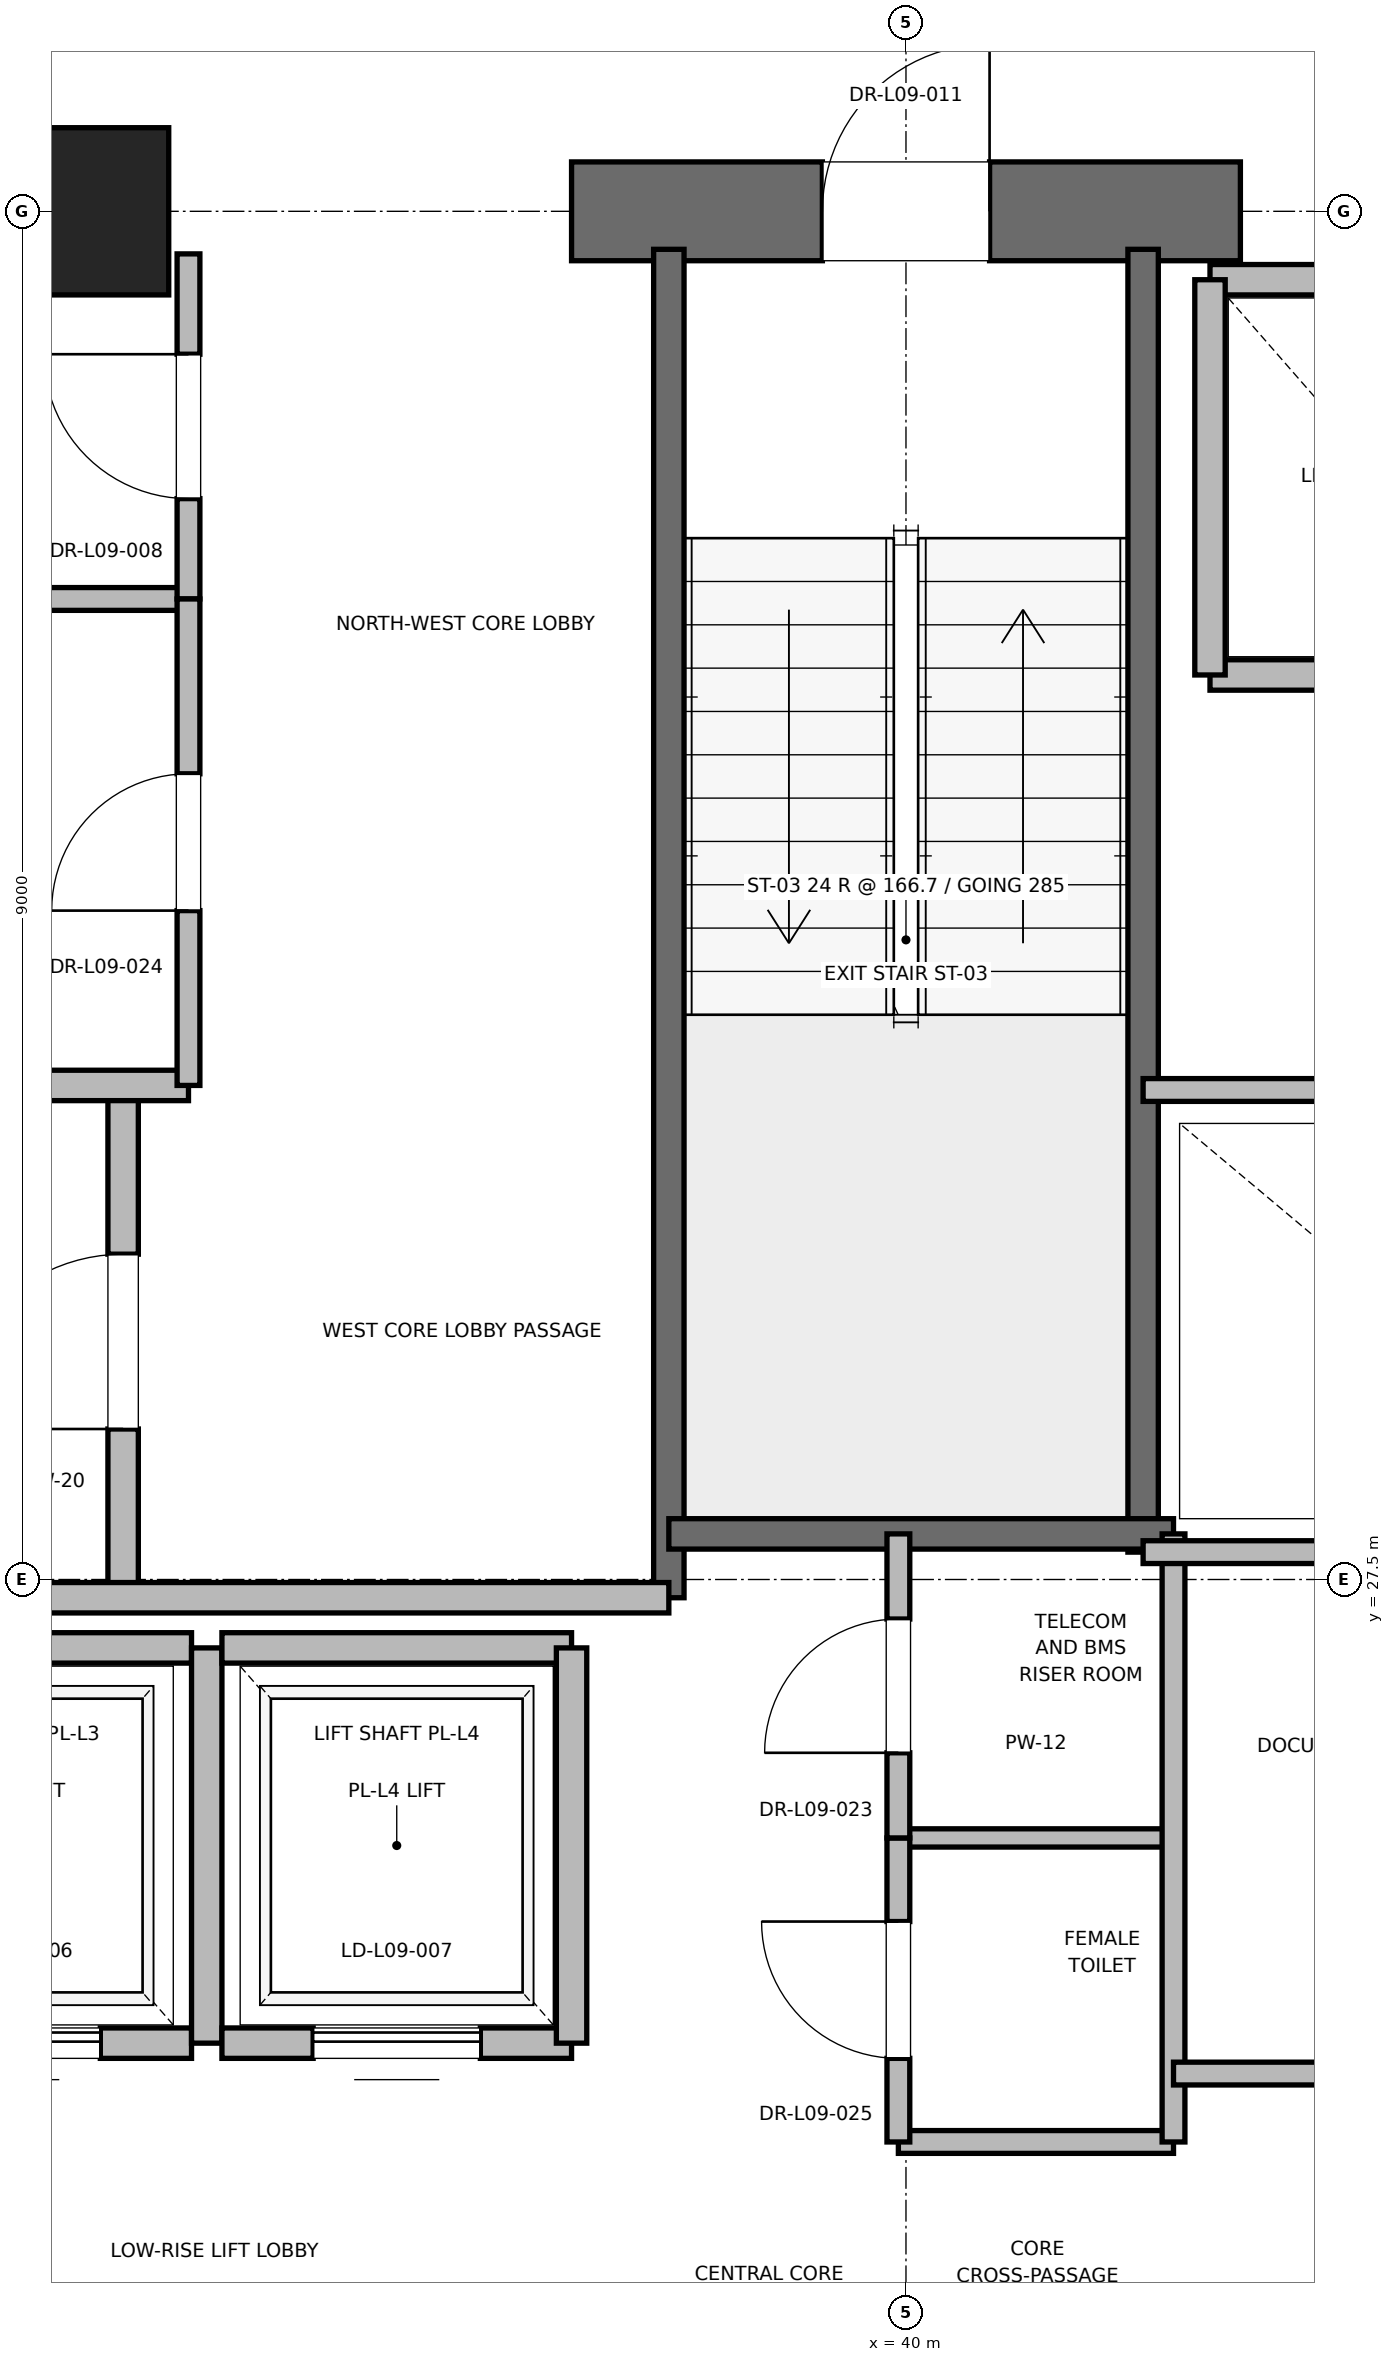
"""IFC4 building model, lengths in metres.
Left out: names, types, materials, properties, quantities, classifications, styles, units other than length and angle.
Written with IfcOpenShell. Run it as: python <this file> out.ifc"""

import sys

from ifc_helpers import new_model, si_unit, direction, frame, frame_2d, origin, origin_2d, place, context, subcontext, project, spatial, rectangle, extrude, element, fill, save


model = new_model("IFC4")
c1 = context("Model", 3, precision=1e-05, world=origin(), true_north=direction((0.0, 1.0)))
c2 = subcontext(c1, "Body", "Model", "MODEL_VIEW")
j1 = project(units=[si_unit("LENGTHUNIT", "METRE"), si_unit("PLANEANGLEUNIT", "RADIAN")], contexts=[c1])
p1 = place(None, origin())
s1 = spatial("IfcSite", under=j1, at=p1, CompositionType="ELEMENT")
p2 = place(p1, origin())
s2 = spatial("IfcBuilding", under=s1, at=p2, CompositionType="ELEMENT")
p3 = place(p2, frame((0.0, 0.0, 43.6)))
s3 = spatial("IfcBuildingStorey", under=s2, at=p3, CompositionType="ELEMENT", Elevation=43.6)
p4 = place(p3, frame((34.6, 36.5, 0.0), z_axis=(0.0, 0.0, 1.0), x_axis=(1.0, 0.0, 0.0)))
e1 = element("IfcColumn", 1, at=p4, inside=s3, PredefinedType="PILASTER", context=c2, shape_type="SweptSolid", body=[
    extrude(rectangle(XDim=1.1, YDim=1.1, at=origin_2d()), origin(), (0.0, 0.0, 1.0), 4.0),
])
p5 = place(p3, frame((29.0, 36.5, 0.0), z_axis=(0.0, 0.0, 1.0), x_axis=(1.0, 0.0, 0.0)))
e2 = element("IfcWall", 2, at=p5, inside=s3, PredefinedType="SHEAR", context=c2, shape_type="SweptSolid", body=[
    extrude(rectangle(XDim=5.8, YDim=0.65, at=frame_2d((2.9, 0.0))), origin(), (0.0, 0.0, 1.0), 3.76),
])
p6 = place(p3, frame((37.8, 36.5, 0.0), z_axis=(0.0, 0.0, 1.0), x_axis=(1.0, 0.0, 0.0)))
e3 = element("IfcWall", 3, at=p6, inside=s3, PredefinedType="SHEAR", context=c2, shape_type="SweptSolid", body=[
    extrude(rectangle(XDim=4.4, YDim=0.65, at=frame_2d((2.2, 0.0))), origin(), (0.0, 0.0, 1.0), 3.76),
])
p7 = place(p6, frame((1.65, 0.0, 0.0)))
e4 = element("IfcOpeningElement", 4, at=p7, cuts=e3, PredefinedType="OPENING", context=c2, shape_type="SweptSolid", body=[
    extrude(rectangle(XDim=1.1, YDim=2.15, at=frame_2d((0.55, 1.075))), frame((0.0, 0.325, 0.0), z_axis=(0.0, -1.0, 0.0), x_axis=(1.0, 0.0, 0.0)), (0.0, 0.0, 1.0), 0.65),
])
p8 = place(p3, frame((38.44, 27.38, 0.0), z_axis=(0.0, 0.0, 1.0), x_axis=(0.0, 1.0, 0.0)))
e5 = element("IfcWall", 5, at=p8, inside=s3, PredefinedType="SOLIDWALL", context=c2, shape_type="SweptSolid", body=[
    extrude(rectangle(XDim=8.87, YDim=0.2, at=frame_2d((4.435, 0.0))), origin(), (0.0, 0.0, 1.0), 3.76),
])
p9 = place(p3, frame((41.56, 27.68, 0.0), z_axis=(0.0, 0.0, 1.0), x_axis=(0.0, 1.0, 0.0)))
e6 = element("IfcWall", 6, at=p9, inside=s3, PredefinedType="SOLIDWALL", context=c2, shape_type="SweptSolid", body=[
    extrude(rectangle(XDim=8.57, YDim=0.2, at=frame_2d((4.285, 0.0))), origin(), (0.0, 0.0, 1.0), 3.76),
])
p10 = place(p3, frame((38.44, 27.8, 0.0), z_axis=(0.0, 0.0, 1.0), x_axis=(1.0, 0.0, 0.0)))
e7 = element("IfcWall", 7, at=p10, inside=s3, PredefinedType="SOLIDWALL", context=c2, shape_type="SweptSolid", body=[
    extrude(rectangle(XDim=3.32, YDim=0.2, at=frame_2d((1.66, 0.0))), origin(), (0.0, 0.0, 1.0), 3.76),
])
p11 = place(p3, frame((34.85, 27.38, 0.0), z_axis=(0.0, 0.0, 1.0), x_axis=(0.0, 1.0, 0.0)))
e8 = element("IfcWall", 8, at=p11, inside=s3, PredefinedType="PARTITIONING", context=c2, shape_type="SweptSolid", body=[
    extrude(rectangle(XDim=3.37, YDim=0.2, at=frame_2d((1.685, 0.0))), origin(), (0.0, 0.0, 1.0), 3.76),
])
p12 = place(p11, frame((1.11, 0.0, 0.0)))
e9 = element("IfcOpeningElement", 9, at=p12, cuts=e8, PredefinedType="OPENING", context=c2, shape_type="SweptSolid", body=[
    extrude(rectangle(XDim=1.15, YDim=2.2, at=frame_2d((0.575, 1.1))), frame((0.0, 0.1, 0.0), z_axis=(0.0, -1.0, 0.0), x_axis=(1.0, 0.0, 0.0)), (0.0, 0.0, 1.0), 0.2),
])
p13 = place(p3, frame((32.82, 27.38, 0.0), z_axis=(0.0, 0.0, 1.0), x_axis=(1.0, 0.0, 0.0)))
e10 = element("IfcWall", 10, at=p13, inside=s3, PredefinedType="PARTITIONING", context=c2, shape_type="SweptSolid", body=[
    extrude(rectangle(XDim=5.62, YDim=0.2, at=frame_2d((2.81, 0.0))), origin(), (0.0, 0.0, 1.0), 3.76),
])
p14 = place(p3, frame((32.15, 30.75, 0.0), z_axis=(0.0, 0.0, 1.0), x_axis=(1.0, 0.0, 0.0)))
e11 = element("IfcWall", 11, at=p14, inside=s3, PredefinedType="PARTITIONING", context=c2, shape_type="SweptSolid", body=[
    extrude(rectangle(XDim=3.13, YDim=0.2, at=frame_2d((1.565, 0.0))), origin(), (0.0, 0.0, 1.0), 3.76),
])
p15 = place(p3, frame((33.0, 24.45, 0.0), z_axis=(0.0, 0.0, 1.0), x_axis=(1.0, 0.0, 0.0)))
e12 = element("IfcWall", 12, at=p15, inside=s3, PredefinedType="SOLIDWALL", context=c2, shape_type="SweptSolid", body=[
    extrude(rectangle(XDim=2.3, YDim=0.2, at=frame_2d((1.15, 0.0))), origin(), (0.0, 0.0, 1.0), 3.76),
])
p16 = place(p15, frame((0.6, 0.0, 0.0)))
e13 = element("IfcOpeningElement", 13, at=p16, cuts=e12, PredefinedType="OPENING", context=c2, shape_type="SweptSolid", body=[
    extrude(rectangle(XDim=1.1, YDim=2.2, at=frame_2d((0.55, 1.1))), frame((0.0, 0.1, 0.0), z_axis=(0.0, -1.0, 0.0), x_axis=(1.0, 0.0, 0.0)), (0.0, 0.0, 1.0), 0.2),
])
p17 = place(p3, frame((35.3, 27.05, 0.0), z_axis=(0.0, 0.0, 1.0), x_axis=(-1.0, 0.0, 0.0)))
e14 = element("IfcWall", 14, at=p17, inside=s3, PredefinedType="SOLIDWALL", context=c2, shape_type="SweptSolid", body=[
    extrude(rectangle(XDim=2.3, YDim=0.2, at=frame_2d((1.15, 0.0))), origin(), (0.0, 0.0, 1.0), 3.76),
])
p18 = place(p3, frame((35.4, 24.45, 0.0), z_axis=(0.0, 0.0, 1.0), x_axis=(0.0, 1.0, 0.0)))
e15 = element("IfcWall", 15, at=p18, inside=s3, PredefinedType="SOLIDWALL", context=c2, shape_type="SweptSolid", body=[
    extrude(rectangle(XDim=2.6, YDim=0.2, at=frame_2d((1.3, 0.0))), origin(), (0.0, 0.0, 1.0), 3.76),
])
p19 = place(p3, frame((35.5, 24.45, 0.0), z_axis=(0.0, 0.0, 1.0), x_axis=(1.0, 0.0, 0.0)))
e16 = element("IfcWall", 16, at=p19, inside=s3, PredefinedType="SOLIDWALL", context=c2, shape_type="SweptSolid", body=[
    extrude(rectangle(XDim=2.3, YDim=0.2, at=frame_2d((1.15, 0.0))), origin(), (0.0, 0.0, 1.0), 3.76),
])
p20 = place(p19, frame((0.6, 0.0, 0.0)))
e17 = element("IfcOpeningElement", 17, at=p20, cuts=e16, PredefinedType="OPENING", context=c2, shape_type="SweptSolid", body=[
    extrude(rectangle(XDim=1.1, YDim=2.2, at=frame_2d((0.55, 1.1))), frame((0.0, 0.1, 0.0), z_axis=(0.0, -1.0, 0.0), x_axis=(1.0, 0.0, 0.0)), (0.0, 0.0, 1.0), 0.2),
])
p21 = place(p3, frame((37.8, 27.05, 0.0), z_axis=(0.0, 0.0, 1.0), x_axis=(-1.0, 0.0, 0.0)))
e18 = element("IfcWall", 18, at=p21, inside=s3, PredefinedType="SOLIDWALL", context=c2, shape_type="SweptSolid", body=[
    extrude(rectangle(XDim=2.3, YDim=0.2, at=frame_2d((1.15, 0.0))), origin(), (0.0, 0.0, 1.0), 3.76),
])
p22 = place(p3, frame((37.8, 24.45, 0.0), z_axis=(0.0, 0.0, 1.0), x_axis=(0.0, 1.0, 0.0)))
e19 = element("IfcWall", 19, at=p22, inside=s3, PredefinedType="SOLIDWALL", context=c2, shape_type="SweptSolid", body=[
    extrude(rectangle(XDim=2.6, YDim=0.2, at=frame_2d((1.3, 0.0))), origin(), (0.0, 0.0, 1.0), 3.76),
])
p23 = place(p3, frame((42.0, 33.45, 0.0), z_axis=(0.0, 0.0, 1.0), x_axis=(1.0, 0.0, 0.0)))
e20 = element("IfcWall", 20, at=p23, inside=s3, PredefinedType="SOLIDWALL", context=c2, shape_type="SweptSolid", body=[
    extrude(rectangle(XDim=2.3, YDim=0.2, at=frame_2d((1.15, 0.0))), origin(), (0.0, 0.0, 1.0), 3.76),
])
p24 = place(p3, frame((44.3, 36.05, 0.0), z_axis=(0.0, 0.0, 1.0), x_axis=(-1.0, 0.0, 0.0)))
e21 = element("IfcWall", 21, at=p24, inside=s3, PredefinedType="SOLIDWALL", context=c2, shape_type="SweptSolid", body=[
    extrude(rectangle(XDim=2.3, YDim=0.2, at=frame_2d((1.15, 0.0))), origin(), (0.0, 0.0, 1.0), 2.54),
])
p25 = place(p3, frame((42.0, 36.05, 0.0), z_axis=(0.0, 0.0, 1.0), x_axis=(0.0, -1.0, 0.0)))
e22 = element("IfcWall", 22, at=p25, inside=s3, PredefinedType="SOLIDWALL", context=c2, shape_type="SweptSolid", body=[
    extrude(rectangle(XDim=2.6, YDim=0.2, at=frame_2d((1.3, 0.0))), origin(), (0.0, 0.0, 1.0), 2.54),
])
p26 = place(p3, frame((39.95, 23.8, 0.0), z_axis=(0.0, 0.0, 1.0), x_axis=(1.0, 0.0, 0.0)))
e23 = element("IfcWall", 23, at=p26, inside=s3, PredefinedType="PARTITIONING", context=c2, shape_type="SweptSolid", body=[
    extrude(rectangle(XDim=1.81, YDim=0.15, at=frame_2d((0.905, 0.0))), origin(), (0.0, 0.0, 1.0), 2.85),
])
p27 = place(p3, frame((39.95, 25.8, 0.0), z_axis=(0.0, 0.0, 1.0), x_axis=(1.0, 0.0, 0.0)))
e24 = element("IfcWall", 24, at=p27, inside=s3, PredefinedType="PARTITIONING", context=c2, shape_type="SweptSolid", body=[
    extrude(rectangle(XDim=1.81, YDim=0.12, at=frame_2d((0.905, 0.0))), origin(), (0.0, 0.0, 1.0), 2.85),
])
p28 = place(p3, frame((41.76, 23.8, 0.0), z_axis=(0.0, 0.0, 1.0), x_axis=(0.0, 1.0, 0.0)))
e25 = element("IfcWall", 25, at=p28, inside=s3, PredefinedType="PARTITIONING", context=c2, shape_type="SweptSolid", body=[
    extrude(rectangle(XDim=4.0, YDim=0.15, at=frame_2d((2.0, 0.0))), origin(), (0.0, 0.0, 1.0), 2.85),
])
p29 = place(p3, frame((39.95, 23.8, 0.0), z_axis=(0.0, 0.0, 1.0), x_axis=(0.0, 1.0, 0.0)))
e26 = element("IfcWall", 26, at=p29, inside=s3, PredefinedType="PARTITIONING", context=c2, shape_type="SweptSolid", body=[
    extrude(rectangle(XDim=2.0, YDim=0.15, at=frame_2d((1.0, 0.0))), origin(), (0.0, 0.0, 1.0), 2.85),
])
p30 = place(p29, frame((0.55, 0.0, 0.0)))
e27 = element("IfcOpeningElement", 27, at=p30, cuts=e26, PredefinedType="OPENING", context=c2, shape_type="SweptSolid", body=[
    extrude(rectangle(XDim=0.9, YDim=2.1, at=frame_2d((0.45, 1.05))), frame((0.0, 0.075, 0.0), z_axis=(0.0, -1.0, 0.0), x_axis=(1.0, 0.0, 0.0)), (0.0, 0.0, 1.0), 0.15),
])
p31 = place(p3, frame((39.95, 25.8, 0.0), z_axis=(0.0, 0.0, 1.0), x_axis=(0.0, 1.0, 0.0)))
e28 = element("IfcWall", 28, at=p31, inside=s3, PredefinedType="PARTITIONING", context=c2, shape_type="SweptSolid", body=[
    extrude(rectangle(XDim=2.0, YDim=0.15, at=frame_2d((1.0, 0.0))), origin(), (0.0, 0.0, 1.0), 2.85),
])
p32 = place(p31, frame((0.56, 0.0, 0.0)))
e29 = element("IfcOpeningElement", 29, at=p32, cuts=e28, PredefinedType="OPENING", context=c2, shape_type="SweptSolid", body=[
    extrude(rectangle(XDim=0.88, YDim=2.1, at=frame_2d((0.44, 1.05))), frame((0.0, 0.075, 0.0), z_axis=(0.0, -1.0, 0.0), x_axis=(1.0, 0.0, 0.0)), (0.0, 0.0, 1.0), 0.15),
])
p33 = place(p3, frame((32.15, 33.95, 0.0), z_axis=(0.0, 0.0, 1.0), x_axis=(1.0, 0.0, 0.0)))
e30 = element("IfcWall", 30, at=p33, inside=s3, PredefinedType="PARTITIONING", context=c2, shape_type="SweptSolid", body=[
    extrude(rectangle(XDim=3.13, YDim=0.15, at=frame_2d((1.565, 0.0))), origin(), (0.0, 0.0, 1.0), 2.85),
])
p34 = place(p3, frame((35.28, 33.95, 0.0), z_axis=(0.0, 0.0, 1.0), x_axis=(0.0, 1.0, 0.0)))
e31 = element("IfcWall", 31, at=p34, inside=s3, PredefinedType="PARTITIONING", context=c2, shape_type="SweptSolid", body=[
    extrude(rectangle(XDim=2.27, YDim=0.15, at=frame_2d((1.135, 0.0))), origin(), (0.0, 0.0, 1.0), 2.54),
])
p35 = place(p34, frame((0.66, 0.0, 0.0)))
e32 = element("IfcOpeningElement", 32, at=p35, cuts=e31, PredefinedType="OPENING", context=c2, shape_type="SweptSolid", body=[
    extrude(rectangle(XDim=0.95, YDim=2.15, at=frame_2d((0.475, 1.075))), frame((0.0, 0.075, 0.0), z_axis=(0.0, -1.0, 0.0), x_axis=(1.0, 0.0, 0.0)), (0.0, 0.0, 1.0), 0.15),
])
p36 = place(p3, frame((35.28, 30.75, 0.0), z_axis=(0.0, 0.0, 1.0), x_axis=(0.0, 1.0, 0.0)))
e33 = element("IfcWall", 33, at=p36, inside=s3, PredefinedType="PARTITIONING", context=c2, shape_type="SweptSolid", body=[
    extrude(rectangle(XDim=3.2, YDim=0.15, at=frame_2d((1.6, 0.0))), origin(), (0.0, 0.0, 1.0), 2.85),
])
p37 = place(p36, frame((1.15, 0.0, 0.0)))
e34 = element("IfcOpeningElement", 34, at=p37, cuts=e33, PredefinedType="OPENING", context=c2, shape_type="SweptSolid", body=[
    extrude(rectangle(XDim=0.9, YDim=2.1, at=frame_2d((0.45, 1.05))), frame((0.0, 0.075, 0.0), z_axis=(0.0, -1.0, 0.0), x_axis=(1.0, 0.0, 0.0)), (0.0, 0.0, 1.0), 0.15),
])
p38 = place(p3, frame((41.56, 27.68, 0.0), z_axis=(0.0, 0.0, 1.0), x_axis=(1.0, 0.0, 0.0)))
e35 = element("IfcWall", 35, at=p38, inside=s3, PredefinedType="PARTITIONING", context=c2, shape_type="SweptSolid", body=[
    extrude(rectangle(XDim=3.59, YDim=0.15, at=frame_2d((1.795, 0.0))), origin(), (0.0, 0.0, 1.0), 2.85),
])
p39 = place(p3, frame((41.76, 24.25, 0.0), z_axis=(0.0, 0.0, 1.0), x_axis=(1.0, 0.0, 0.0)))
e36 = element("IfcWall", 36, at=p39, inside=s3, PredefinedType="PARTITIONING", context=c2, shape_type="SweptSolid", body=[
    extrude(rectangle(XDim=3.39, YDim=0.15, at=frame_2d((1.695, 0.0))), origin(), (0.0, 0.0, 1.0), 2.85),
])
p40 = place(p39, frame((1.195, 0.0, 0.0)))
e37 = element("IfcOpeningElement", 37, at=p40, cuts=e36, PredefinedType="OPENING", context=c2, shape_type="SweptSolid", body=[
    extrude(rectangle(XDim=1.0, YDim=2.15, at=frame_2d((0.5, 1.075))), frame((0.0, 0.075, 0.0), z_axis=(0.0, -1.0, 0.0), x_axis=(1.0, 0.0, 0.0)), (0.0, 0.0, 1.0), 0.15),
])
p41 = place(p3, frame((41.56, 30.72, 0.0), z_axis=(0.0, 0.0, 1.0), x_axis=(1.0, 0.0, 0.0)))
e38 = element("IfcWall", 38, at=p41, inside=s3, PredefinedType="PARTITIONING", context=c2, shape_type="SweptSolid", body=[
    extrude(rectangle(XDim=3.59, YDim=0.15, at=frame_2d((1.795, 0.0))), origin(), (0.0, 0.0, 1.0), 2.85),
])
p42 = place(p41, frame((1.355, 0.0, 0.0)))
e39 = element("IfcOpeningElement", 39, at=p42, cuts=e38, PredefinedType="OPENING", context=c2, shape_type="SweptSolid", body=[
    extrude(rectangle(XDim=0.88, YDim=2.1, at=frame_2d((0.44, 1.05))), frame((0.0, 0.075, 0.0), z_axis=(0.0, -1.0, 0.0), x_axis=(1.0, 0.0, 0.0)), (0.0, 0.0, 1.0), 0.15),
])
p43 = place(p7, origin())
e40 = element("IfcDoor", 40, at=p43, inside=s3, OperationType="SINGLE_SWING_RIGHT", PredefinedType="DOOR", context=c2, shape_type="SweptSolid", body=[
    extrude(rectangle(XDim=1.1, YDim=2.15, at=frame_2d((0.55, 1.075))), frame((0.0, 0.025, 0.0), z_axis=(0.0, -1.0, 0.0), x_axis=(1.0, 0.0, 0.0)), (0.0, 0.0, 1.0), 0.05),
])
fill(e4, e40)
p44 = place(p12, origin())
e41 = element("IfcDoor", 41, at=p44, inside=s3, OperationType="SINGLE_SWING_LEFT", PredefinedType="DOOR", context=c2, shape_type="SweptSolid", body=[
    extrude(rectangle(XDim=1.15, YDim=2.2, at=frame_2d((0.575, 1.1))), frame((0.0, 0.025, 0.0), z_axis=(0.0, -1.0, 0.0), x_axis=(1.0, 0.0, 0.0)), (0.0, 0.0, 1.0), 0.05),
])
fill(e9, e41)
p45 = place(p16, origin())
e42 = element("IfcDoor", 42, at=p45, inside=s3, OperationType="SLIDING_TO_RIGHT", PredefinedType="DOOR", context=c2, shape_type="SweptSolid", body=[
    extrude(rectangle(XDim=1.1, YDim=2.2, at=frame_2d((0.55, 1.1))), frame((0.0, 0.025, 0.0), z_axis=(0.0, -1.0, 0.0), x_axis=(1.0, 0.0, 0.0)), (0.0, 0.0, 1.0), 0.05),
])
fill(e13, e42)
p46 = place(p20, origin())
e43 = element("IfcDoor", 43, at=p46, inside=s3, OperationType="SLIDING_TO_RIGHT", PredefinedType="DOOR", context=c2, shape_type="SweptSolid", body=[
    extrude(rectangle(XDim=1.1, YDim=2.2, at=frame_2d((0.55, 1.1))), frame((0.0, 0.025, 0.0), z_axis=(0.0, -1.0, 0.0), x_axis=(1.0, 0.0, 0.0)), (0.0, 0.0, 1.0), 0.05),
])
fill(e17, e43)
p47 = place(p30, origin())
e44 = element("IfcDoor", 44, at=p47, inside=s3, OperationType="SINGLE_SWING_RIGHT", PredefinedType="DOOR", context=c2, shape_type="SweptSolid", body=[
    extrude(rectangle(XDim=0.9, YDim=2.1, at=frame_2d((0.45, 1.05))), frame((0.0, 0.025, 0.0), z_axis=(0.0, -1.0, 0.0), x_axis=(1.0, 0.0, 0.0)), (0.0, 0.0, 1.0), 0.05),
])
fill(e27, e44)
p48 = place(p32, origin())
e45 = element("IfcDoor", 45, at=p48, inside=s3, OperationType="SINGLE_SWING_LEFT", PredefinedType="DOOR", context=c2, shape_type="SweptSolid", body=[
    extrude(rectangle(XDim=0.88, YDim=2.1, at=frame_2d((0.44, 1.05))), frame((0.0, 0.025, 0.0), z_axis=(0.0, -1.0, 0.0), x_axis=(1.0, 0.0, 0.0)), (0.0, 0.0, 1.0), 0.05),
])
fill(e29, e45)
p49 = place(p35, origin())
e46 = element("IfcDoor", 46, at=p49, inside=s3, OperationType="SINGLE_SWING_RIGHT", PredefinedType="DOOR", context=c2, shape_type="SweptSolid", body=[
    extrude(rectangle(XDim=0.95, YDim=2.15, at=frame_2d((0.475, 1.075))), frame((0.0, 0.025, 0.0), z_axis=(0.0, -1.0, 0.0), x_axis=(1.0, 0.0, 0.0)), (0.0, 0.0, 1.0), 0.05),
])
fill(e32, e46)
p50 = place(p37, origin())
e47 = element("IfcDoor", 47, at=p50, inside=s3, OperationType="SINGLE_SWING_LEFT", PredefinedType="DOOR", context=c2, shape_type="SweptSolid", body=[
    extrude(rectangle(XDim=0.9, YDim=2.1, at=frame_2d((0.45, 1.05))), frame((0.0, 0.025, 0.0), z_axis=(0.0, -1.0, 0.0), x_axis=(1.0, 0.0, 0.0)), (0.0, 0.0, 1.0), 0.05),
])
fill(e34, e47)
save(model, sys.argv[1])
